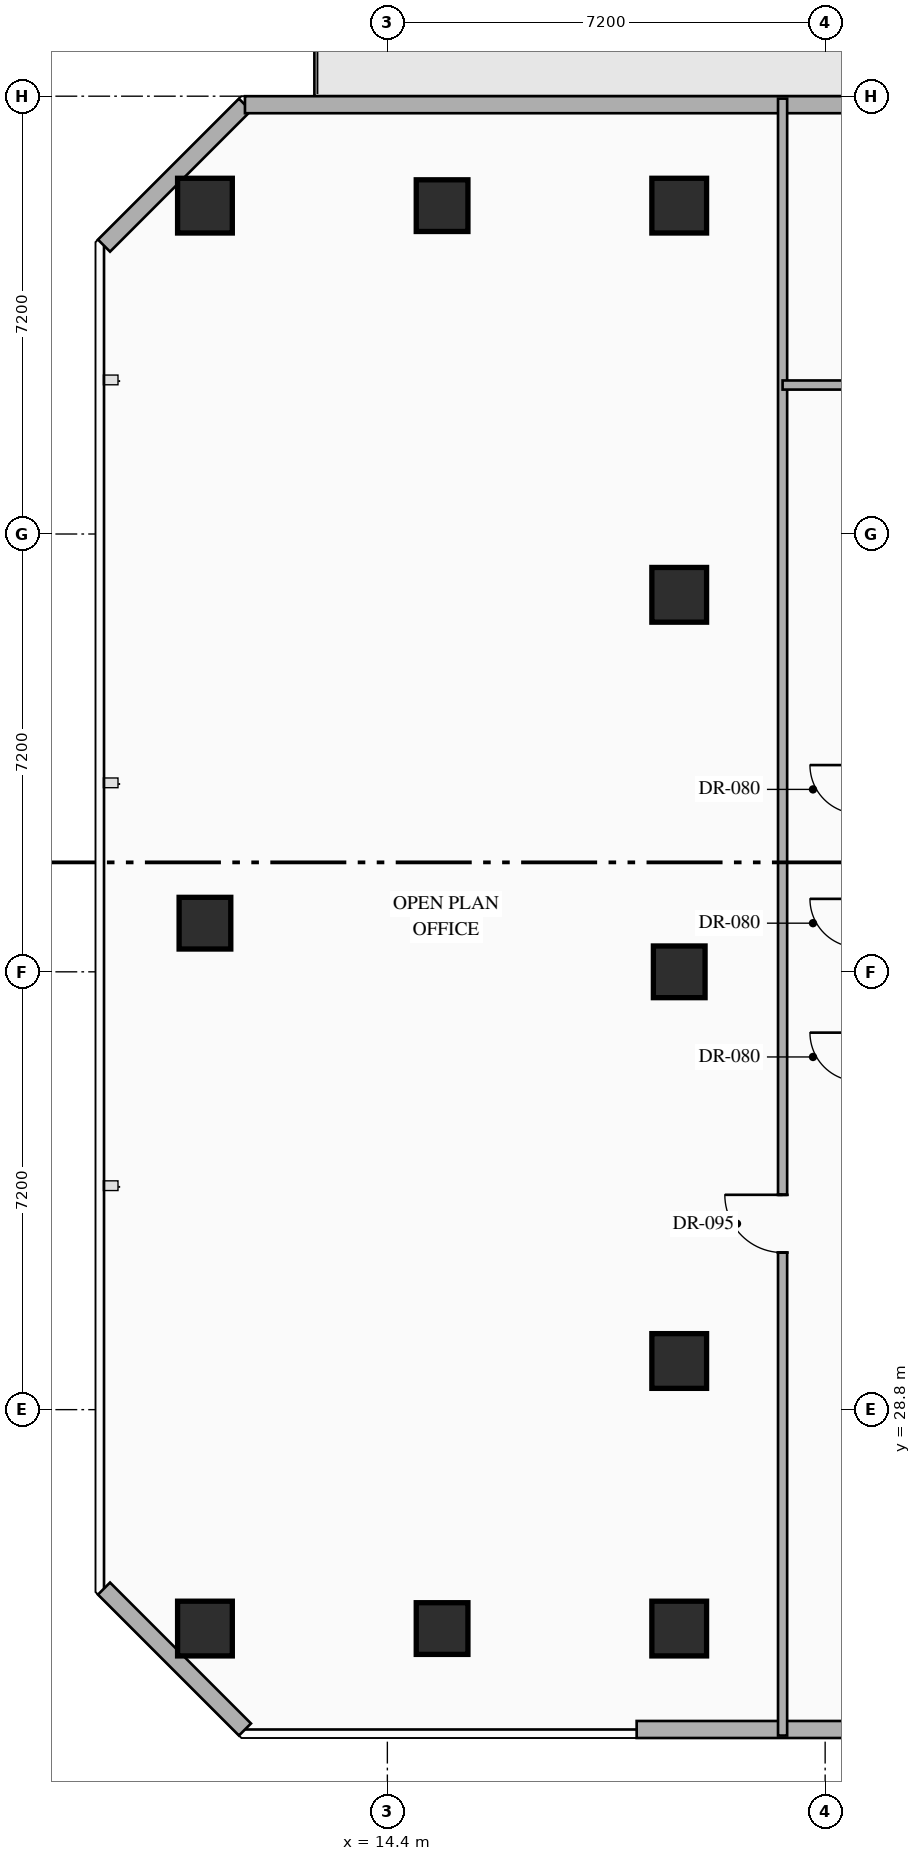
"""IFC4 building model, lengths in metres.
Left out: names, types, materials, properties, quantities, classifications, styles, units other than length and angle.
Written with IfcOpenShell. Run it as: python <this file> out.ifc"""

import sys

from ifc_helpers import new_model, si_unit, direction, frame, frame_2d, origin, origin_2d, place, context, subcontext, project, spatial, rectangle, hollow_rectangle, extrude, element, fill, save


model = new_model("IFC4")
c1 = context("Model", 3, precision=1e-05, world=origin(), true_north=direction((0.0, 1.0)))
c2 = subcontext(c1, "Body", "Model", "MODEL_VIEW")
j1 = project(units=[si_unit("LENGTHUNIT", "METRE"), si_unit("PLANEANGLEUNIT", "RADIAN")], contexts=[c1])
p1 = place(None, origin())
s1 = spatial("IfcSite", under=j1, at=p1, CompositionType="ELEMENT")
p2 = place(p1, origin())
s2 = spatial("IfcBuilding", under=s1, at=p2, CompositionType="ELEMENT")
p3 = place(p2, frame((0.0, 0.0, 104.85)))
s3 = spatial("IfcBuildingStorey", under=s2, at=p3, CompositionType="ELEMENT", Elevation=104.85)
for number, where, z_axis, x_axis in (
    (1, (11.4, 25.2, 0.0), (0.0, 0.0, 1.0), (1.0, 0.0, 0.0)),
    (2, (11.4, 48.6, 0.0), (0.0, 0.0, 1.0), (1.0, 0.0, 0.0)),
    (3, (19.2, 48.6, 0.0), (0.0, 0.0, 1.0), (1.0, 0.0, 0.0)),
    (4, (19.2, 25.2, 0.0), (0.0, 0.0, 1.0), (1.0, 0.0, 0.0)),
    (5, (19.2, 29.6, 0.0), (0.0, 0.0, 1.0), (1.0, 0.0, 0.0)),
    (6, (19.2, 42.2, 0.0), (0.0, 0.0, 1.0), (1.0, 0.0, 0.0)),
):
    element("IfcColumn", number, at=place(p3, frame(where, z_axis=z_axis, x_axis=x_axis)), inside=s3, PredefinedType="COLUMN", context=c2, shape_type="SweptSolid", body=[
        extrude(hollow_rectangle(XDim=0.9, YDim=0.9, WallThickness=0.036, at=origin_2d()), origin(), (0.0, 0.0, 1.0), 3.6),
    ])
for number, where, z_axis, x_axis in (
    (7, (11.4, 36.8, 0.0), (0.0, 0.0, 1.0), (1.0, 0.0, 0.0)),
    (8, (19.2, 36.0, 0.0), (0.0, 0.0, 1.0), (1.0, 0.0, 0.0)),
    (9, (15.3, 25.2, 0.0), (0.0, 0.0, 1.0), (1.0, 0.0, 0.0)),
    (10, (15.3, 48.6, 0.0), (0.0, 0.0, 1.0), (1.0, 0.0, 0.0)),
):
    element("IfcColumn", number, at=place(p3, frame(where, z_axis=z_axis, x_axis=x_axis)), inside=s3, PredefinedType="COLUMN", context=c2, shape_type="SweptSolid", body=[
        extrude(hollow_rectangle(XDim=0.85, YDim=0.85, WallThickness=0.032, at=origin_2d()), origin(), (0.0, 0.0, 1.0), 3.6),
    ])
p4 = place(p3, frame((25.247, 23.54, 0.0), z_axis=(0.0, 0.0, 1.0), x_axis=(-1.0, 0.0, 0.0)))
e11 = element("IfcWall", 11, at=p4, inside=s3, PredefinedType="STANDARD", context=c2, shape_type="SweptSolid", body=[
    extrude(rectangle(XDim=6.747, YDim=0.28, at=frame_2d((3.374, 0.0))), origin(), (0.0, 0.0, 1.0), 3.35),
])
p5 = place(p3, frame((12.058, 23.54, 0.0), z_axis=(0.0, 0.0, 1.0), x_axis=(-0.707144017911, 0.707069542501, 0.0)))
e12 = element("IfcWall", 12, at=p5, inside=s3, PredefinedType="STANDARD", context=c2, shape_type="SweptSolid", body=[
    extrude(rectangle(XDim=3.278, YDim=0.28, at=frame_2d((1.639, 0.0))), origin(), (0.0, 0.0, 1.0), 3.35),
])
p6 = place(p3, frame((9.74, 47.942, 0.0), z_axis=(0.0, 0.0, 1.0), x_axis=(0.707106781187, 0.707106781187, 0.0)))
e13 = element("IfcWall", 13, at=p6, inside=s3, PredefinedType="STANDARD", context=c2, shape_type="SweptSolid", body=[
    extrude(rectangle(XDim=3.278, YDim=0.28, at=frame_2d((1.639, 0.0))), origin(), (0.0, 0.0, 1.0), 3.35),
])
p7 = place(p3, frame((12.058, 50.26, 0.0), z_axis=(0.0, 0.0, 1.0), x_axis=(1.0, 0.0, 0.0)))
e14 = element("IfcWall", 14, at=p7, inside=s3, PredefinedType="STANDARD", context=c2, shape_type="SweptSolid", body=[
    extrude(rectangle(XDim=30.484, YDim=0.28, at=frame_2d((15.242, 0.0))), origin(), (0.0, 0.0, 1.0), 3.35),
])
p8 = place(p7, frame((14.992, 0.0, 0.0)))
e15 = element("IfcOpeningElement", 15, at=p8, cuts=e14, PredefinedType="OPENING", context=c2, shape_type="SweptSolid", body=[
    extrude(rectangle(XDim=1.1, YDim=2.2, at=frame_2d((0.55, 1.1))), frame((0.0, 0.15, 0.0), z_axis=(0.0, -1.0, 0.0), x_axis=(1.0, 0.0, 0.0)), (0.0, 0.0, 1.0), 0.3),
])
p9 = place(p7, frame((10.074, 0.0, 0.85)))
e16 = element("IfcOpeningElement", 16, at=p9, cuts=e14, PredefinedType="OPENING", context=c2, shape_type="SweptSolid", body=[
    extrude(rectangle(XDim=1.8, YDim=2.1, at=frame_2d((0.9, 1.05))), frame((0.0, 0.15, 0.0), z_axis=(0.0, -1.0, 0.0), x_axis=(1.0, 0.0, 0.0)), (0.0, 0.0, 1.0), 0.3),
])
p10 = place(p3, frame((20.9, 23.44, 0.0), z_axis=(0.0, 0.0, 1.0), x_axis=(0.0, 1.0, 0.0)))
e17 = element("IfcWall", 17, at=p10, inside=s3, PredefinedType="PARTITIONING", context=c2, shape_type="SweptSolid", body=[
    extrude(rectangle(XDim=26.92, YDim=0.15, at=frame_2d((13.46, 0.0))), origin(), (0.0, 0.0, 1.0), 3.35),
])
p11 = place(p10, frame((7.943, 0.0, 0.0)))
e18 = element("IfcOpeningElement", 18, at=p11, cuts=e17, PredefinedType="OPENING", context=c2, shape_type="SweptSolid", body=[
    extrude(rectangle(XDim=0.95, YDim=2.15, at=frame_2d((0.475, 1.075))), frame((0.0, 0.085, 0.0), z_axis=(0.0, -1.0, 0.0), x_axis=(1.0, 0.0, 0.0)), (0.0, 0.0, 1.0), 0.17),
])
p12 = place(p3, frame((20.9, 45.65, 0.0), z_axis=(0.0, 0.0, 1.0), x_axis=(1.0, 0.0, 0.0)))
e19 = element("IfcWall", 19, at=p12, inside=s3, PredefinedType="PARTITIONING", context=c2, shape_type="SweptSolid", body=[
    extrude(rectangle(XDim=24.06, YDim=0.15, at=frame_2d((12.03, 0.0))), origin(), (0.0, 0.0, 1.0), 2.695),
])
p13 = place(p12, frame((9.32, 0.0, 0.0)))
e20 = element("IfcOpeningElement", 20, at=p13, cuts=e19, PredefinedType="OPENING", context=c2, shape_type="SweptSolid", body=[
    extrude(rectangle(XDim=0.95, YDim=2.15, at=frame_2d((0.475, 1.075))), frame((0.0, 0.085, 0.0), z_axis=(0.0, -1.0, 0.0), x_axis=(1.0, 0.0, 0.0)), (0.0, 0.0, 1.0), 0.17),
])
p14 = place(p11, origin())
e21 = element("IfcDoor", 21, at=p14, inside=s3, OperationType="SINGLE_SWING_RIGHT", PredefinedType="DOOR", context=c2, shape_type="SweptSolid", body=[
    extrude(rectangle(XDim=0.95, YDim=2.15, at=frame_2d((0.475, 1.075))), frame((0.0, 0.025, 0.0), z_axis=(0.0, -1.0, 0.0), x_axis=(1.0, 0.0, 0.0)), (0.0, 0.0, 1.0), 0.05),
])
fill(e18, e21)
save(model, sys.argv[1])
